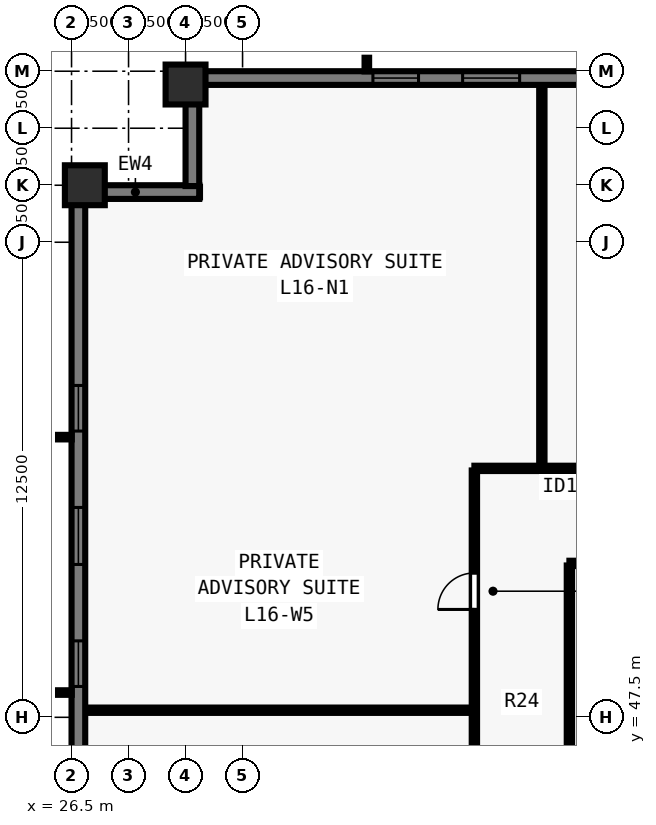
"""IFC4 building model, lengths in metres.
Left out: names, types, materials, properties, quantities, classifications, styles, units other than length and angle.
Written with IfcOpenShell. Run it as: python <this file> out.ifc"""

import sys

from ifc_helpers import new_model, si_unit, direction, frame, frame_2d, origin, origin_2d, place, context, subcontext, project, spatial, rectangle, extrude, element, fill, save


model = new_model("IFC4")
c1 = context("Model", 3, precision=1e-05, world=origin(), true_north=direction((0.0, 1.0)))
c2 = subcontext(c1, "Body", "Model", "MODEL_VIEW")
j1 = project(units=[si_unit("LENGTHUNIT", "METRE"), si_unit("PLANEANGLEUNIT", "RADIAN")], contexts=[c1])
p1 = place(None, origin())
s1 = spatial("IfcSite", under=j1, at=p1, CompositionType="ELEMENT")
p2 = place(p1, origin())
s2 = spatial("IfcBuilding", under=s1, at=p2, CompositionType="ELEMENT")
p3 = place(p2, frame((0.0, 0.0, 62.0)))
s3 = spatial("IfcBuildingStorey", under=s2, at=p3, CompositionType="ELEMENT", Elevation=62.0)
for number, where, z_axis, x_axis in (
    (1, (29.5, 64.15, 0.0), (0.0, 0.0, 1.0), (1.0, 0.0, 0.0)),
    (2, (26.85, 61.5, 0.0), (0.0, 0.0, 1.0), (0.0, 1.0, 0.0)),
):
    element("IfcColumn", number, at=place(p3, frame(where, z_axis=z_axis, x_axis=x_axis)), inside=s3, PredefinedType="COLUMN", context=c2, shape_type="SweptSolid", body=[
        extrude(rectangle(XDim=1.05, YDim=1.05, at=origin_2d()), origin(), (0.0, 0.0, 1.0), 3.5),
    ])
p4 = place(p3, frame((26.68, 16.5, 0.0), z_axis=(0.0, 0.0, 1.0), x_axis=(0.0, 1.0, 0.0)))
e3 = element("IfcWall", 3, at=p4, inside=s3, PredefinedType="SOLIDWALL", context=c2, shape_type="SweptSolid", body=[
    extrude(rectangle(XDim=44.662, YDim=0.36, at=frame_2d((22.331, 0.0))), origin(), (0.0, 0.0, 1.0), 3.28),
])
p5 = place(p4, frame((4.93, 0.0, 0.8)))
e4 = element("IfcOpeningElement", 4, at=p5, cuts=e3, PredefinedType="OPENING", context=c2, shape_type="SweptSolid", body=[
    extrude(rectangle(XDim=1.2, YDim=1.544, at=frame_2d((0.6, 0.772))), frame((0.0, 0.19, 0.0), z_axis=(0.0, -1.0, 0.0), x_axis=(1.0, 0.0, 0.0)), (0.0, 0.0, 1.0), 0.38),
])
p6 = place(p4, frame((8.14, 0.0, 0.8)))
e5 = element("IfcOpeningElement", 5, at=p6, cuts=e3, PredefinedType="OPENING", context=c2, shape_type="SweptSolid", body=[
    extrude(rectangle(XDim=1.5, YDim=1.544, at=frame_2d((0.75, 0.772))), frame((0.0, 0.19, 0.0), z_axis=(0.0, -1.0, 0.0), x_axis=(1.0, 0.0, 0.0)), (0.0, 0.0, 1.0), 0.38),
])
p7 = place(p4, frame((11.65, 0.0, 0.8)))
e6 = element("IfcOpeningElement", 6, at=p7, cuts=e3, PredefinedType="OPENING", context=c2, shape_type="SweptSolid", body=[
    extrude(rectangle(XDim=1.2, YDim=1.544, at=frame_2d((0.6, 0.772))), frame((0.0, 0.19, 0.0), z_axis=(0.0, -1.0, 0.0), x_axis=(1.0, 0.0, 0.0)), (0.0, 0.0, 1.0), 0.38),
])
p8 = place(p4, frame((14.861, 0.0, 0.8)))
e7 = element("IfcOpeningElement", 7, at=p8, cuts=e3, PredefinedType="OPENING", context=c2, shape_type="SweptSolid", body=[
    extrude(rectangle(XDim=1.5, YDim=1.544, at=frame_2d((0.75, 0.772))), frame((0.0, 0.19, 0.0), z_axis=(0.0, -1.0, 0.0), x_axis=(1.0, 0.0, 0.0)), (0.0, 0.0, 1.0), 0.38),
])
p9 = place(p4, frame((19.621, 0.0, 0.8)))
e8 = element("IfcOpeningElement", 8, at=p9, cuts=e3, PredefinedType="OPENING", context=c2, shape_type="SweptSolid", body=[
    extrude(rectangle(XDim=1.2, YDim=1.544, at=frame_2d((0.6, 0.772))), frame((0.0, 0.19, 0.0), z_axis=(0.0, -1.0, 0.0), x_axis=(1.0, 0.0, 0.0)), (0.0, 0.0, 1.0), 0.38),
])
p10 = place(p4, frame((21.581, 0.0, 0.8)))
e9 = element("IfcOpeningElement", 9, at=p10, cuts=e3, PredefinedType="OPENING", context=c2, shape_type="SweptSolid", body=[
    extrude(rectangle(XDim=1.5, YDim=1.544, at=frame_2d((0.75, 0.772))), frame((0.0, 0.19, 0.0), z_axis=(0.0, -1.0, 0.0), x_axis=(1.0, 0.0, 0.0)), (0.0, 0.0, 1.0), 0.38),
])
p11 = place(p4, frame((24.241, 0.0, 0.8)))
e10 = element("IfcOpeningElement", 10, at=p11, cuts=e3, PredefinedType="OPENING", context=c2, shape_type="SweptSolid", body=[
    extrude(rectangle(XDim=1.2, YDim=1.544, at=frame_2d((0.6, 0.772))), frame((0.0, 0.19, 0.0), z_axis=(0.0, -1.0, 0.0), x_axis=(1.0, 0.0, 0.0)), (0.0, 0.0, 1.0), 0.38),
])
p12 = place(p4, frame((28.302, 0.0, 0.8)))
e11 = element("IfcOpeningElement", 11, at=p12, cuts=e3, PredefinedType="OPENING", context=c2, shape_type="SweptSolid", body=[
    extrude(rectangle(XDim=1.5, YDim=1.544, at=frame_2d((0.75, 0.772))), frame((0.0, 0.19, 0.0), z_axis=(0.0, -1.0, 0.0), x_axis=(1.0, 0.0, 0.0)), (0.0, 0.0, 1.0), 0.38),
])
p13 = place(p4, frame((31.812, 0.0, 0.8)))
e12 = element("IfcOpeningElement", 12, at=p13, cuts=e3, PredefinedType="OPENING", context=c2, shape_type="SweptSolid", body=[
    extrude(rectangle(XDim=1.2, YDim=1.544, at=frame_2d((0.6, 0.772))), frame((0.0, 0.19, 0.0), z_axis=(0.0, -1.0, 0.0), x_axis=(1.0, 0.0, 0.0)), (0.0, 0.0, 1.0), 0.38),
])
p14 = place(p4, frame((35.022, 0.0, 0.8)))
e13 = element("IfcOpeningElement", 13, at=p14, cuts=e3, PredefinedType="OPENING", context=c2, shape_type="SweptSolid", body=[
    extrude(rectangle(XDim=1.5, YDim=1.544, at=frame_2d((0.75, 0.772))), frame((0.0, 0.19, 0.0), z_axis=(0.0, -1.0, 0.0), x_axis=(1.0, 0.0, 0.0)), (0.0, 0.0, 1.0), 0.38),
])
p15 = place(p4, frame((38.532, 0.0, 0.8)))
e14 = element("IfcOpeningElement", 14, at=p15, cuts=e3, PredefinedType="OPENING", context=c2, shape_type="SweptSolid", body=[
    extrude(rectangle(XDim=1.2, YDim=1.544, at=frame_2d((0.6, 0.772))), frame((0.0, 0.19, 0.0), z_axis=(0.0, -1.0, 0.0), x_axis=(1.0, 0.0, 0.0)), (0.0, 0.0, 1.0), 0.38),
])
p16 = place(p3, frame((26.5, 61.32, 0.0), z_axis=(0.0, 0.0, 1.0), x_axis=(1.0, 0.0, 0.0)))
e15 = element("IfcWall", 15, at=p16, inside=s3, PredefinedType="SOLIDWALL", context=c2, shape_type="SweptSolid", body=[
    extrude(rectangle(XDim=3.36, YDim=0.36, at=frame_2d((1.68, 0.0))), origin(), (0.0, 0.0, 1.0), 3.28),
])
p17 = place(p3, frame((29.68, 61.478, 0.0), z_axis=(0.0, 0.0, 1.0), x_axis=(0.0, 1.0, 0.0)))
e16 = element("IfcWall", 16, at=p17, inside=s3, PredefinedType="SOLIDWALL", context=c2, shape_type="SweptSolid", body=[
    extrude(rectangle(XDim=2.684, YDim=0.36, at=frame_2d((1.342, 0.0))), origin(), (0.0, 0.0, 1.0), 3.28),
])
p18 = place(p3, frame((29.5, 64.32, 0.0), z_axis=(0.0, 0.0, 1.0), x_axis=(1.0, 0.0, 0.0)))
e17 = element("IfcWall", 17, at=p18, inside=s3, PredefinedType="SOLIDWALL", context=c2, shape_type="SweptSolid", body=[
    extrude(rectangle(XDim=44.662, YDim=0.36, at=frame_2d((22.331, 0.0))), origin(), (0.0, 0.0, 1.0), 3.28),
])
p19 = place(p18, frame((4.93, 0.0, 0.8)))
e18 = element("IfcOpeningElement", 18, at=p19, cuts=e17, PredefinedType="OPENING", context=c2, shape_type="SweptSolid", body=[
    extrude(rectangle(XDim=1.2, YDim=1.544, at=frame_2d((0.6, 0.772))), frame((0.0, 0.19, 0.0), z_axis=(0.0, -1.0, 0.0), x_axis=(1.0, 0.0, 0.0)), (0.0, 0.0, 1.0), 0.38),
])
p20 = place(p18, frame((7.29, 0.0, 0.8)))
e19 = element("IfcOpeningElement", 19, at=p20, cuts=e17, PredefinedType="OPENING", context=c2, shape_type="SweptSolid", body=[
    extrude(rectangle(XDim=1.5, YDim=1.544, at=frame_2d((0.75, 0.772))), frame((0.0, 0.19, 0.0), z_axis=(0.0, -1.0, 0.0), x_axis=(1.0, 0.0, 0.0)), (0.0, 0.0, 1.0), 0.38),
])
p21 = place(p18, frame((11.65, 0.0, 0.8)))
e20 = element("IfcOpeningElement", 20, at=p21, cuts=e17, PredefinedType="OPENING", context=c2, shape_type="SweptSolid", body=[
    extrude(rectangle(XDim=1.2, YDim=1.544, at=frame_2d((0.6, 0.772))), frame((0.0, 0.19, 0.0), z_axis=(0.0, -1.0, 0.0), x_axis=(1.0, 0.0, 0.0)), (0.0, 0.0, 1.0), 0.38),
])
p22 = place(p18, frame((14.861, 0.0, 0.8)))
e21 = element("IfcOpeningElement", 21, at=p22, cuts=e17, PredefinedType="OPENING", context=c2, shape_type="SweptSolid", body=[
    extrude(rectangle(XDim=1.5, YDim=1.544, at=frame_2d((0.75, 0.772))), frame((0.0, 0.19, 0.0), z_axis=(0.0, -1.0, 0.0), x_axis=(1.0, 0.0, 0.0)), (0.0, 0.0, 1.0), 0.38),
])
p23 = place(p18, frame((18.821, 0.0, 0.8)))
e22 = element("IfcOpeningElement", 22, at=p23, cuts=e17, PredefinedType="OPENING", context=c2, shape_type="SweptSolid", body=[
    extrude(rectangle(XDim=1.2, YDim=1.544, at=frame_2d((0.6, 0.772))), frame((0.0, 0.19, 0.0), z_axis=(0.0, -1.0, 0.0), x_axis=(1.0, 0.0, 0.0)), (0.0, 0.0, 1.0), 0.38),
])
p24 = place(p18, frame((20.731, 0.0, 0.8)))
e23 = element("IfcOpeningElement", 23, at=p24, cuts=e17, PredefinedType="OPENING", context=c2, shape_type="SweptSolid", body=[
    extrude(rectangle(XDim=1.5, YDim=1.544, at=frame_2d((0.75, 0.772))), frame((0.0, 0.19, 0.0), z_axis=(0.0, -1.0, 0.0), x_axis=(1.0, 0.0, 0.0)), (0.0, 0.0, 1.0), 0.38),
])
p25 = place(p18, frame((25.091, 0.0, 0.8)))
e24 = element("IfcOpeningElement", 24, at=p25, cuts=e17, PredefinedType="OPENING", context=c2, shape_type="SweptSolid", body=[
    extrude(rectangle(XDim=1.2, YDim=1.544, at=frame_2d((0.6, 0.772))), frame((0.0, 0.19, 0.0), z_axis=(0.0, -1.0, 0.0), x_axis=(1.0, 0.0, 0.0)), (0.0, 0.0, 1.0), 0.38),
])
p26 = place(p18, frame((28.302, 0.0, 0.8)))
e25 = element("IfcOpeningElement", 25, at=p26, cuts=e17, PredefinedType="OPENING", context=c2, shape_type="SweptSolid", body=[
    extrude(rectangle(XDim=1.5, YDim=1.544, at=frame_2d((0.75, 0.772))), frame((0.0, 0.19, 0.0), z_axis=(0.0, -1.0, 0.0), x_axis=(1.0, 0.0, 0.0)), (0.0, 0.0, 1.0), 0.38),
])
p27 = place(p18, frame((31.812, 0.0, 0.8)))
e26 = element("IfcOpeningElement", 26, at=p27, cuts=e17, PredefinedType="OPENING", context=c2, shape_type="SweptSolid", body=[
    extrude(rectangle(XDim=1.2, YDim=1.544, at=frame_2d((0.6, 0.772))), frame((0.0, 0.19, 0.0), z_axis=(0.0, -1.0, 0.0), x_axis=(1.0, 0.0, 0.0)), (0.0, 0.0, 1.0), 0.38),
])
p28 = place(p18, frame((35.022, 0.0, 0.8)))
e27 = element("IfcOpeningElement", 27, at=p28, cuts=e17, PredefinedType="OPENING", context=c2, shape_type="SweptSolid", body=[
    extrude(rectangle(XDim=1.5, YDim=1.544, at=frame_2d((0.75, 0.772))), frame((0.0, 0.19, 0.0), z_axis=(0.0, -1.0, 0.0), x_axis=(1.0, 0.0, 0.0)), (0.0, 0.0, 1.0), 0.38),
])
p29 = place(p18, frame((38.532, 0.0, 0.8)))
e28 = element("IfcOpeningElement", 28, at=p29, cuts=e17, PredefinedType="OPENING", context=c2, shape_type="SweptSolid", body=[
    extrude(rectangle(XDim=1.2, YDim=1.544, at=frame_2d((0.6, 0.772))), frame((0.0, 0.19, 0.0), z_axis=(0.0, -1.0, 0.0), x_axis=(1.0, 0.0, 0.0)), (0.0, 0.0, 1.0), 0.38),
])
p30 = place(p3, frame((37.1, 54.05, 0.0), z_axis=(0.0, 0.0, 1.0), x_axis=(1.0, 0.0, 0.0)))
e29 = element("IfcWall", 29, at=p30, inside=s3, PredefinedType="PARTITIONING", context=c2, shape_type="SweptSolid", body=[
    extrude(rectangle(XDim=29.8, YDim=0.14, at=frame_2d((14.9, 0.0))), origin(), (0.0, 0.0, 1.0), 3.28),
])
p31 = place(p30, frame((3.522, 0.0, 0.0)))
e30 = element("IfcOpeningElement", 30, at=p31, cuts=e29, PredefinedType="OPENING", context=c2, shape_type="SweptSolid", body=[
    extrude(rectangle(XDim=0.96, YDim=2.12, at=frame_2d((0.48, 1.06))), frame((0.0, 0.08, 0.0), z_axis=(0.0, -1.0, 0.0), x_axis=(1.0, 0.0, 0.0)), (0.0, 0.0, 1.0), 0.16),
])
p32 = place(p30, frame((8.06, 0.0, 0.0)))
e31 = element("IfcOpeningElement", 31, at=p32, cuts=e29, PredefinedType="OPENING", context=c2, shape_type="SweptSolid", body=[
    extrude(rectangle(XDim=0.96, YDim=2.12, at=frame_2d((0.48, 1.06))), frame((0.0, 0.08, 0.0), z_axis=(0.0, -1.0, 0.0), x_axis=(1.0, 0.0, 0.0)), (0.0, 0.0, 1.0), 0.16),
])
p33 = place(p30, frame((20.6, 0.0, 0.0)))
e32 = element("IfcOpeningElement", 32, at=p33, cuts=e29, PredefinedType="OPENING", context=c2, shape_type="SweptSolid", body=[
    extrude(rectangle(XDim=0.96, YDim=2.12, at=frame_2d((0.48, 1.06))), frame((0.0, 0.08, 0.0), z_axis=(0.0, -1.0, 0.0), x_axis=(1.0, 0.0, 0.0)), (0.0, 0.0, 1.0), 0.16),
])
p34 = place(p30, frame((28.48, 0.0, 0.0)))
e33 = element("IfcOpeningElement", 33, at=p34, cuts=e29, PredefinedType="OPENING", context=c2, shape_type="SweptSolid", body=[
    extrude(rectangle(XDim=0.96, YDim=2.12, at=frame_2d((0.48, 1.06))), frame((0.0, 0.08, 0.0), z_axis=(0.0, -1.0, 0.0), x_axis=(1.0, 0.0, 0.0)), (0.0, 0.0, 1.0), 0.16),
])
p35 = place(p3, frame((37.1, 24.005, 0.0), z_axis=(0.0, 0.0, 1.0), x_axis=(0.0, 1.0, 0.0)))
e34 = element("IfcWall", 34, at=p35, inside=s3, PredefinedType="PARTITIONING", context=c2, shape_type="SweptSolid", body=[
    extrude(rectangle(XDim=29.99, YDim=0.14, at=frame_2d((14.995, 0.0))), origin(), (0.0, 0.0, 1.0), 3.28),
])
p36 = place(p35, frame((2.76, 0.0, 0.0)))
e35 = element("IfcOpeningElement", 35, at=p36, cuts=e34, PredefinedType="OPENING", context=c2, shape_type="SweptSolid", body=[
    extrude(rectangle(XDim=0.96, YDim=2.12, at=frame_2d((0.48, 1.06))), frame((0.0, 0.08, 0.0), z_axis=(0.0, -1.0, 0.0), x_axis=(1.0, 0.0, 0.0)), (0.0, 0.0, 1.0), 0.16),
])
p37 = place(p35, frame((8.598, 0.0, 0.0)))
e36 = element("IfcOpeningElement", 36, at=p37, cuts=e34, PredefinedType="OPENING", context=c2, shape_type="SweptSolid", body=[
    extrude(rectangle(XDim=0.96, YDim=2.12, at=frame_2d((0.48, 1.06))), frame((0.0, 0.08, 0.0), z_axis=(0.0, -1.0, 0.0), x_axis=(1.0, 0.0, 0.0)), (0.0, 0.0, 1.0), 0.16),
])
p38 = place(p35, frame((14.578, 0.0, 0.0)))
e37 = element("IfcOpeningElement", 37, at=p38, cuts=e34, PredefinedType="OPENING", context=c2, shape_type="SweptSolid", body=[
    extrude(rectangle(XDim=0.96, YDim=2.12, at=frame_2d((0.48, 1.06))), frame((0.0, 0.08, 0.0), z_axis=(0.0, -1.0, 0.0), x_axis=(1.0, 0.0, 0.0)), (0.0, 0.0, 1.0), 0.16),
])
p39 = place(p35, frame((20.558, 0.0, 0.0)))
e38 = element("IfcOpeningElement", 38, at=p39, cuts=e34, PredefinedType="OPENING", context=c2, shape_type="SweptSolid", body=[
    extrude(rectangle(XDim=0.96, YDim=2.12, at=frame_2d((0.48, 1.06))), frame((0.0, 0.08, 0.0), z_axis=(0.0, -1.0, 0.0), x_axis=(1.0, 0.0, 0.0)), (0.0, 0.0, 1.0), 0.16),
])
p40 = place(p35, frame((26.333, 0.0, 0.0)))
e39 = element("IfcOpeningElement", 39, at=p40, cuts=e34, PredefinedType="OPENING", context=c2, shape_type="SweptSolid", body=[
    extrude(rectangle(XDim=0.96, YDim=2.12, at=frame_2d((0.48, 1.06))), frame((0.0, 0.08, 0.0), z_axis=(0.0, -1.0, 0.0), x_axis=(1.0, 0.0, 0.0)), (0.0, 0.0, 1.0), 0.16),
])
p41 = place(p3, frame((39.6, 51.55, 0.0), z_axis=(0.0, 0.0, 1.0), x_axis=(1.0, 0.0, 0.0)))
e40 = element("IfcWall", 40, at=p41, inside=s3, PredefinedType="PARTITIONING", context=c2, shape_type="SweptSolid", body=[
    extrude(rectangle(XDim=24.8, YDim=0.14, at=frame_2d((12.4, 0.0))), origin(), (0.0, 0.0, 1.0), 3.28),
])
p42 = place(p41, frame((3.2, 0.0, 0.0)))
e41 = element("IfcOpeningElement", 41, at=p42, cuts=e40, PredefinedType="OPENING", context=c2, shape_type="SweptSolid", body=[
    extrude(rectangle(XDim=0.96, YDim=2.12, at=frame_2d((0.48, 1.06))), frame((0.0, 0.08, 0.0), z_axis=(0.0, -1.0, 0.0), x_axis=(1.0, 0.0, 0.0)), (0.0, 0.0, 1.0), 0.16),
])
p43 = place(p41, frame((18.4, 0.0, 0.0)))
e42 = element("IfcOpeningElement", 42, at=p43, cuts=e40, PredefinedType="OPENING", context=c2, shape_type="SweptSolid", body=[
    extrude(rectangle(XDim=0.96, YDim=2.12, at=frame_2d((0.48, 1.06))), frame((0.0, 0.08, 0.0), z_axis=(0.0, -1.0, 0.0), x_axis=(1.0, 0.0, 0.0)), (0.0, 0.0, 1.0), 0.16),
])
p44 = place(p3, frame((39.6, 40.8, 0.0), z_axis=(0.0, 0.0, 1.0), x_axis=(0.0, 1.0, 0.0)))
e43 = element("IfcWall", 43, at=p44, inside=s3, PredefinedType="PARTITIONING", context=c2, shape_type="SweptSolid", body=[
    extrude(rectangle(XDim=10.695, YDim=0.14, at=frame_2d((5.348, 0.0))), origin(), (0.0, 0.0, 1.0), 3.28),
])
p45 = place(p44, frame((2.5, 0.0, 0.0)))
e44 = element("IfcOpeningElement", 44, at=p45, cuts=e43, PredefinedType="OPENING", context=c2, shape_type="SweptSolid", body=[
    extrude(rectangle(XDim=0.88, YDim=2.1, at=frame_2d((0.44, 1.05))), frame((0.0, 0.08, 0.0), z_axis=(0.0, -1.0, 0.0), x_axis=(1.0, 0.0, 0.0)), (0.0, 0.0, 1.0), 0.16),
])
p46 = place(p3, frame((38.875, 54.15, 0.0), z_axis=(0.0, 0.0, 1.0), x_axis=(0.0, 1.0, 0.0)))
e45 = element("IfcWall", 45, at=p46, inside=s3, PredefinedType="PARTITIONING", context=c2, shape_type="SweptSolid", body=[
    extrude(rectangle(XDim=9.93, YDim=0.14, at=frame_2d((4.965, 0.0))), origin(), (0.0, 0.0, 1.0), 3.28),
])
p47 = place(p3, frame((26.92, 47.687, 0.0), z_axis=(0.0, 0.0, 1.0), x_axis=(1.0, 0.0, 0.0)))
e46 = element("IfcWall", 46, at=p47, inside=s3, PredefinedType="PARTITIONING", context=c2, shape_type="SweptSolid", body=[
    extrude(rectangle(XDim=10.08, YDim=0.14, at=frame_2d((5.04, 0.0))), origin(), (0.0, 0.0, 1.0), 3.28),
])
p48 = place(p13, origin())
e47 = element("IfcWindow", 47, at=p48, inside=s3, PartitioningType="SINGLE_PANEL", PredefinedType="WINDOW", context=c2, shape_type="SweptSolid", body=[
    extrude(rectangle(XDim=1.2, YDim=1.544, at=frame_2d((0.6, 0.772))), frame((0.0, -0.05, 0.0), z_axis=(0.0, -1.0, 0.0), x_axis=(1.0, 0.0, 0.0)), (0.0, 0.0, 1.0), 0.06),
])
fill(e12, e47)
p49 = place(p14, origin())
e48 = element("IfcWindow", 48, at=p49, inside=s3, PartitioningType="SINGLE_PANEL", PredefinedType="WINDOW", context=c2, shape_type="SweptSolid", body=[
    extrude(rectangle(XDim=1.5, YDim=1.544, at=frame_2d((0.75, 0.772))), frame((0.0, -0.05, 0.0), z_axis=(0.0, -1.0, 0.0), x_axis=(1.0, 0.0, 0.0)), (0.0, 0.0, 1.0), 0.06),
])
fill(e13, e48)
p50 = place(p15, origin())
e49 = element("IfcWindow", 49, at=p50, inside=s3, PartitioningType="SINGLE_PANEL", PredefinedType="WINDOW", context=c2, shape_type="SweptSolid", body=[
    extrude(rectangle(XDim=1.2, YDim=1.544, at=frame_2d((0.6, 0.772))), frame((0.0, -0.05, 0.0), z_axis=(0.0, -1.0, 0.0), x_axis=(1.0, 0.0, 0.0)), (0.0, 0.0, 1.0), 0.06),
])
fill(e14, e49)
p51 = place(p19, origin())
e50 = element("IfcWindow", 50, at=p51, inside=s3, PartitioningType="SINGLE_PANEL", PredefinedType="WINDOW", context=c2, shape_type="SweptSolid", body=[
    extrude(rectangle(XDim=1.2, YDim=1.544, at=frame_2d((0.6, 0.772))), frame((0.0, -0.05, 0.0), z_axis=(0.0, -1.0, 0.0), x_axis=(1.0, 0.0, 0.0)), (0.0, 0.0, 1.0), 0.06),
])
fill(e18, e50)
p52 = place(p20, origin())
e51 = element("IfcWindow", 51, at=p52, inside=s3, PartitioningType="SINGLE_PANEL", PredefinedType="WINDOW", context=c2, shape_type="SweptSolid", body=[
    extrude(rectangle(XDim=1.5, YDim=1.544, at=frame_2d((0.75, 0.772))), frame((0.0, -0.05, 0.0), z_axis=(0.0, -1.0, 0.0), x_axis=(1.0, 0.0, 0.0)), (0.0, 0.0, 1.0), 0.06),
])
fill(e19, e51)
p53 = place(p40, origin())
e52 = element("IfcDoor", 52, at=p53, inside=s3, OperationType="SINGLE_SWING_LEFT", PredefinedType="DOOR", context=c2, shape_type="SweptSolid", body=[
    extrude(rectangle(XDim=0.96, YDim=2.12, at=frame_2d((0.48, 1.06))), frame((0.0, 0.025, 0.0), z_axis=(0.0, -1.0, 0.0), x_axis=(1.0, 0.0, 0.0)), (0.0, 0.0, 1.0), 0.05),
])
fill(e39, e52)
save(model, sys.argv[1])
